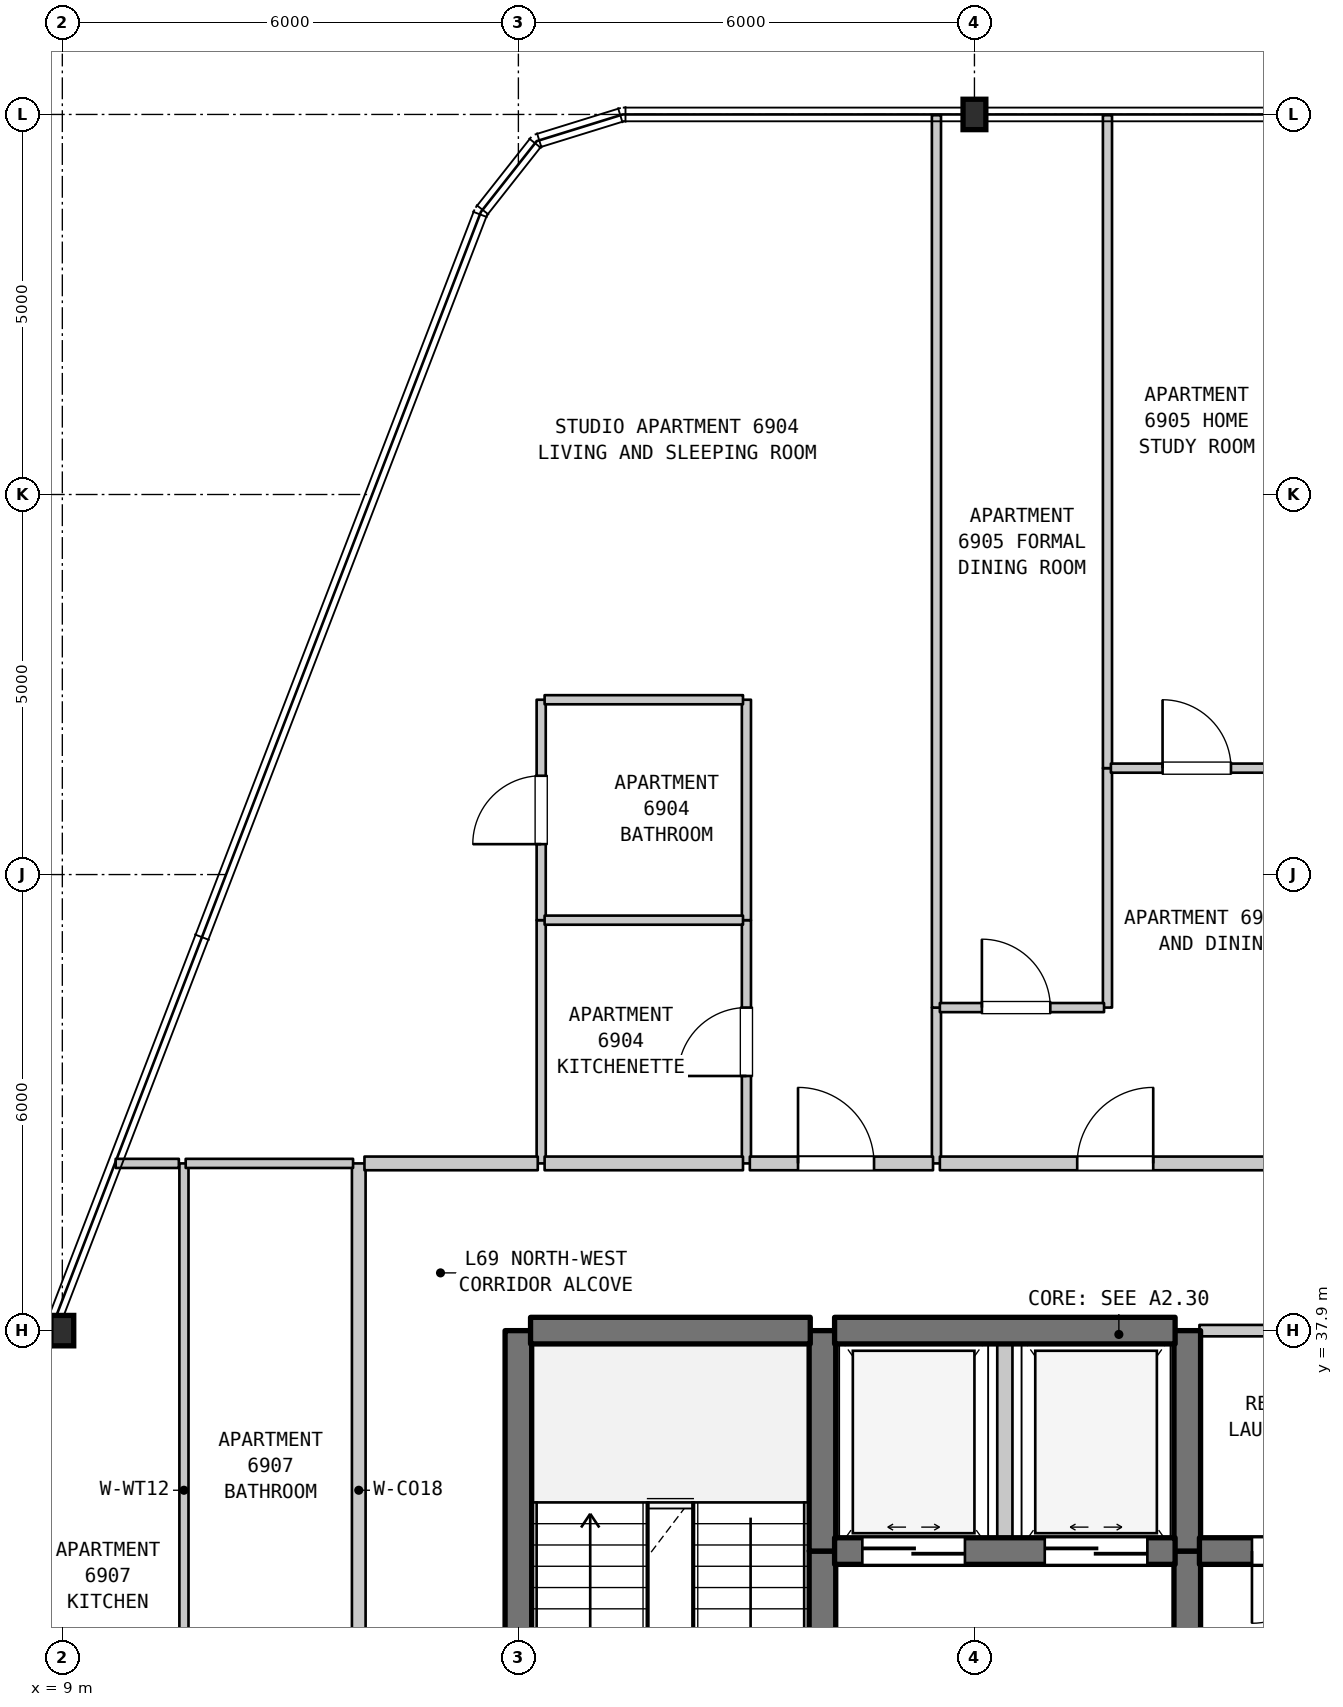
"""IFC4 building model, lengths in metres.
Left out: names, types, materials, properties, quantities, classifications, styles, units other than length and angle.
Written with IfcOpenShell. Run it as: python <this file> out.ifc"""

import sys

from ifc_helpers import new_model, si_unit, direction, frame, frame_2d, origin, origin_2d, place, context, subcontext, project, spatial, rectangle, i_section, extrude, element, fill, save


model = new_model("IFC4")
c1 = context("Model", 3, precision=1e-05, world=origin(), true_north=direction((0.0, 1.0)))
c2 = subcontext(c1, "Body", "Model", "MODEL_VIEW")
j1 = project(units=[si_unit("LENGTHUNIT", "METRE"), si_unit("PLANEANGLEUNIT", "RADIAN")], contexts=[c1])
p1 = place(None, origin())
s1 = spatial("IfcSite", under=j1, at=p1, CompositionType="ELEMENT")
p2 = place(p1, origin())
s2 = spatial("IfcBuilding", under=s1, at=p2, CompositionType="ELEMENT")
p3 = place(p2, frame((0.0, 0.0, 276.9)))
s3 = spatial("IfcBuildingStorey", under=s2, at=p3, CompositionType="ELEMENT", Elevation=276.9)
for number, where, z_axis, x_axis in (
    (1, (9.0, 37.9, 0.0), (0.0, 0.0, 1.0), (1.0, 0.0, 0.0)),
    (2, (21.0, 53.9, 0.0), (0.0, 0.0, 1.0), (1.0, 0.0, 0.0)),
):
    element("IfcColumn", number, at=place(p3, frame(where, z_axis=z_axis, x_axis=x_axis)), inside=s3, PredefinedType="COLUMN", context=c2, shape_type="SweptSolid", body=[
        extrude(i_section(OverallWidth=0.3, OverallDepth=0.4, WebThickness=0.013, FlangeThickness=0.024, FilletRadius=0.027, at=origin_2d()), origin(), (0.0, 0.0, 1.0), 3.7),
    ])
p4 = place(p3, frame((10.6, 31.5, 0.0), z_axis=(0.0, 0.0, 1.0), x_axis=(0.0, 1.0, 0.0)))
e3 = element("IfcWall", 3, at=p4, inside=s3, PredefinedType="PARTITIONING", context=c2, shape_type="SweptSolid", body=[
    extrude(rectangle(XDim=8.6, YDim=0.12, at=frame_2d((4.3, 0.0))), origin(), (0.0, 0.0, 1.0), 3.39),
])
p5 = place(p3, frame((12.9, 31.5, 0.0), z_axis=(0.0, 0.0, 1.0), x_axis=(0.0, 1.0, 0.0)))
e4 = element("IfcWall", 4, at=p5, inside=s3, PredefinedType="STANDARD", context=c2, shape_type="SweptSolid", body=[
    extrude(rectangle(XDim=8.6, YDim=0.18, at=frame_2d((4.3, 0.0))), origin(), (0.0, 0.0, 1.0), 3.39),
])
p6 = place(p3, frame((15.0, 31.1, 0.0), z_axis=(0.0, 0.0, 1.0), x_axis=(0.0, 1.0, 0.0)))
e5 = element("IfcWall", 5, at=p6, inside=s3, PredefinedType="SHEAR", context=c2, shape_type="SweptSolid", body=[
    extrude(rectangle(XDim=6.8, YDim=0.35, at=frame_2d((3.4, 0.0))), origin(), (0.0, 0.0, 1.0), 3.39),
])
p7 = place(p3, frame((15.3, 40.1, 0.0), z_axis=(0.0, 0.0, 1.0), x_axis=(0.0, 1.0, 0.0)))
e6 = element("IfcWall", 6, at=p7, inside=s3, PredefinedType="PARTITIONING", context=c2, shape_type="SweptSolid", body=[
    extrude(rectangle(XDim=3.2, YDim=0.12, at=frame_2d((1.6, 0.0))), origin(), (0.0, 0.0, 1.0), 3.39),
])
p8 = place(p3, frame((15.3, 43.3, 0.0), z_axis=(0.0, 0.0, 1.0), x_axis=(0.0, 1.0, 0.0)))
e7 = element("IfcWall", 7, at=p8, inside=s3, PredefinedType="PARTITIONING", context=c2, shape_type="SweptSolid", body=[
    extrude(rectangle(XDim=2.9, YDim=0.12, at=frame_2d((1.45, 0.0))), origin(), (0.0, 0.0, 1.0), 3.39),
])
p9 = place(p8, frame((1.0, 0.0, 0.0)))
e8 = element("IfcOpeningElement", 8, at=p9, cuts=e7, PredefinedType="OPENING", context=c2, shape_type="SweptSolid", body=[
    extrude(rectangle(XDim=0.9, YDim=2.1, at=frame_2d((0.45, 1.05))), frame((0.0, 0.07, 0.0), z_axis=(0.0, -1.0, 0.0), x_axis=(1.0, 0.0, 0.0)), (0.0, 0.0, 1.0), 0.14),
])
p10 = place(p3, frame((18.0, 40.1, 0.0), z_axis=(0.0, 0.0, 1.0), x_axis=(0.0, 1.0, 0.0)))
e9 = element("IfcWall", 9, at=p10, inside=s3, PredefinedType="PARTITIONING", context=c2, shape_type="SweptSolid", body=[
    extrude(rectangle(XDim=3.2, YDim=0.12, at=frame_2d((1.6, 0.0))), origin(), (0.0, 0.0, 1.0), 3.39),
])
p11 = place(p10, frame((1.15, 0.0, 0.0)))
e10 = element("IfcOpeningElement", 10, at=p11, cuts=e9, PredefinedType="OPENING", context=c2, shape_type="SweptSolid", body=[
    extrude(rectangle(XDim=0.9, YDim=2.15, at=frame_2d((0.45, 1.075))), frame((0.0, 0.07, 0.0), z_axis=(0.0, -1.0, 0.0), x_axis=(1.0, 0.0, 0.0)), (0.0, 0.0, 1.0), 0.14),
])
p12 = place(p3, frame((18.0, 43.3, 0.0), z_axis=(0.0, 0.0, 1.0), x_axis=(0.0, 1.0, 0.0)))
e11 = element("IfcWall", 11, at=p12, inside=s3, PredefinedType="PARTITIONING", context=c2, shape_type="SweptSolid", body=[
    extrude(rectangle(XDim=2.9, YDim=0.12, at=frame_2d((1.45, 0.0))), origin(), (0.0, 0.0, 1.0), 3.39),
])
p13 = place(p3, frame((19.0, 29.5, 0.0), z_axis=(0.0, 0.0, 1.0), x_axis=(0.0, 1.0, 0.0)))
e12 = element("IfcWall", 12, at=p13, inside=s3, PredefinedType="SHEAR", context=c2, shape_type="SweptSolid", body=[
    extrude(rectangle(XDim=5.5, YDim=0.35, at=frame_2d((2.75, 0.0))), origin(), (0.0, 0.0, 1.0), 3.39),
])
p14 = place(p13, frame((2.025, 0.0, 0.0)))
e13 = element("IfcOpeningElement", 13, at=p14, cuts=e12, PredefinedType="OPENING", context=c2, shape_type="SweptSolid", body=[
    extrude(rectangle(XDim=1.1, YDim=2.15, at=frame_2d((0.55, 1.075))), frame((0.0, 0.185, 0.0), z_axis=(0.0, -1.0, 0.0), x_axis=(1.0, 0.0, 0.0)), (0.0, 0.0, 1.0), 0.37),
])
p15 = place(p3, frame((19.0, 35.0, 0.0), z_axis=(0.0, 0.0, 1.0), x_axis=(0.0, 1.0, 0.0)))
e14 = element("IfcWall", 14, at=p15, inside=s3, PredefinedType="SHEAR", context=c2, shape_type="SweptSolid", body=[
    extrude(rectangle(XDim=2.9, YDim=0.35, at=frame_2d((1.45, 0.0))), origin(), (0.0, 0.0, 1.0), 3.39),
])
p16 = place(p3, frame((20.5, 40.1, 0.0), z_axis=(0.0, 0.0, 1.0), x_axis=(0.0, 1.0, 0.0)))
e15 = element("IfcWall", 15, at=p16, inside=s3, PredefinedType="PARTITIONING", context=c2, shape_type="SweptSolid", body=[
    extrude(rectangle(XDim=2.05, YDim=0.12, at=frame_2d((1.025, 0.0))), origin(), (0.0, 0.0, 1.0), 3.39),
])
p17 = place(p3, frame((20.5, 42.15, 0.0), z_axis=(0.0, 0.0, 1.0), x_axis=(0.0, 1.0, 0.0)))
e16 = element("IfcWall", 16, at=p17, inside=s3, PredefinedType="PARTITIONING", context=c2, shape_type="SweptSolid", body=[
    extrude(rectangle(XDim=11.74, YDim=0.12, at=frame_2d((5.87, 0.0))), origin(), (0.0, 0.0, 1.0), 3.39),
])
p18 = place(p3, frame((21.4, 35.0, 0.0), z_axis=(0.0, 0.0, 1.0), x_axis=(0.0, 1.0, 0.0)))
e17 = element("IfcWall", 17, at=p18, inside=s3, PredefinedType="STANDARD", context=c2, shape_type="SweptSolid", body=[
    extrude(rectangle(XDim=2.9, YDim=0.2, at=frame_2d((1.45, 0.0))), origin(), (0.0, 0.0, 1.0), 3.39),
])
p19 = place(p3, frame((22.75, 42.15, 0.0), z_axis=(0.0, 0.0, 1.0), x_axis=(0.0, 1.0, 0.0)))
e18 = element("IfcWall", 18, at=p19, inside=s3, PredefinedType="PARTITIONING", context=c2, shape_type="SweptSolid", body=[
    extrude(rectangle(XDim=3.15, YDim=0.12, at=frame_2d((1.575, 0.0))), origin(), (0.0, 0.0, 1.0), 3.39),
])
p20 = place(p3, frame((22.75, 45.3, 0.0), z_axis=(0.0, 0.0, 1.0), x_axis=(0.0, 1.0, 0.0)))
e19 = element("IfcWall", 19, at=p20, inside=s3, PredefinedType="PARTITIONING", context=c2, shape_type="SweptSolid", body=[
    extrude(rectangle(XDim=8.59, YDim=0.12, at=frame_2d((4.295, 0.0))), origin(), (0.0, 0.0, 1.0), 3.39),
])
p21 = place(p3, frame((23.8, 31.5, 0.0), z_axis=(0.0, 0.0, 1.0), x_axis=(0.0, 1.0, 0.0)))
e20 = element("IfcWall", 20, at=p21, inside=s3, PredefinedType="SHEAR", context=c2, shape_type="SweptSolid", body=[
    extrude(rectangle(XDim=3.5, YDim=0.35, at=frame_2d((1.75, 0.0))), origin(), (0.0, 0.0, 1.0), 3.39),
])
p22 = place(p21, frame((1.127, 0.0, 0.0)))
e21 = element("IfcOpeningElement", 21, at=p22, cuts=e20, PredefinedType="OPENING", context=c2, shape_type="SweptSolid", body=[
    extrude(rectangle(XDim=1.1, YDim=2.15, at=frame_2d((0.55, 1.075))), frame((0.0, 0.185, 0.0), z_axis=(0.0, -1.0, 0.0), x_axis=(1.0, 0.0, 0.0)), (0.0, 0.0, 1.0), 0.37),
])
p23 = place(p3, frame((23.8, 35.0, 0.0), z_axis=(0.0, 0.0, 1.0), x_axis=(0.0, 1.0, 0.0)))
e22 = element("IfcWall", 22, at=p23, inside=s3, PredefinedType="SHEAR", context=c2, shape_type="SweptSolid", body=[
    extrude(rectangle(XDim=2.9, YDim=0.35, at=frame_2d((1.45, 0.0))), origin(), (0.0, 0.0, 1.0), 3.39),
])
p24 = place(p3, frame((19.16, 35.0, 0.0), z_axis=(0.0, 0.0, 1.0), x_axis=(1.0, 0.0, 0.0)))
e23 = element("IfcWall", 23, at=p24, inside=s3, PredefinedType="SHEAR", context=c2, shape_type="SweptSolid", body=[
    extrude(rectangle(XDim=4.48, YDim=0.35, at=frame_2d((2.24, 0.0))), origin(), (0.0, 0.0, 1.0), 3.39),
])
p25 = place(p24, frame((0.365, 0.0, 0.0)))
e24 = element("IfcOpeningElement", 24, at=p25, cuts=e23, PredefinedType="OPENING", context=c2, shape_type="SweptSolid", body=[
    extrude(rectangle(XDim=1.35, YDim=2.2, at=frame_2d((0.675, 1.1))), frame((0.0, 0.185, 0.0), z_axis=(0.0, -1.0, 0.0), x_axis=(1.0, 0.0, 0.0)), (0.0, 0.0, 1.0), 0.37),
])
p26 = place(p24, frame((2.765, 0.0, 0.0)))
e25 = element("IfcOpeningElement", 25, at=p26, cuts=e23, PredefinedType="OPENING", context=c2, shape_type="SweptSolid", body=[
    extrude(rectangle(XDim=1.35, YDim=2.2, at=frame_2d((0.675, 1.1))), frame((0.0, 0.185, 0.0), z_axis=(0.0, -1.0, 0.0), x_axis=(1.0, 0.0, 0.0)), (0.0, 0.0, 1.0), 0.37),
])
p27 = place(p3, frame((23.96, 35.0, 0.0), z_axis=(0.0, 0.0, 1.0), x_axis=(1.0, 0.0, 0.0)))
e26 = element("IfcWall", 26, at=p27, inside=s3, PredefinedType="SHEAR", context=c2, shape_type="SweptSolid", body=[
    extrude(rectangle(XDim=2.595, YDim=0.35, at=frame_2d((1.297, 0.0))), origin(), (0.0, 0.0, 1.0), 3.39),
])
p28 = place(p27, frame((0.691, 0.0, 0.0)))
e27 = element("IfcOpeningElement", 27, at=p28, cuts=e26, PredefinedType="OPENING", context=c2, shape_type="SweptSolid", body=[
    extrude(rectangle(XDim=0.95, YDim=2.15, at=frame_2d((0.475, 1.075))), frame((0.0, 0.185, 0.0), z_axis=(0.0, -1.0, 0.0), x_axis=(1.0, 0.0, 0.0)), (0.0, 0.0, 1.0), 0.37),
])
p29 = place(p3, frame((15.16, 37.9, 0.0), z_axis=(0.0, 0.0, 1.0), x_axis=(1.0, 0.0, 0.0)))
e28 = element("IfcWall", 28, at=p29, inside=s3, PredefinedType="SHEAR", context=c2, shape_type="SweptSolid", body=[
    extrude(rectangle(XDim=3.68, YDim=0.35, at=frame_2d((1.84, 0.0))), origin(), (0.0, 0.0, 1.0), 3.39),
])
p30 = place(p3, frame((19.16, 37.9, 0.0), z_axis=(0.0, 0.0, 1.0), x_axis=(1.0, 0.0, 0.0)))
e29 = element("IfcWall", 29, at=p30, inside=s3, PredefinedType="SHEAR", context=c2, shape_type="SweptSolid", body=[
    extrude(rectangle(XDim=4.48, YDim=0.35, at=frame_2d((2.24, 0.0))), origin(), (0.0, 0.0, 1.0), 3.39),
])
p31 = place(p3, frame((23.96, 37.9, 0.0), z_axis=(0.0, 0.0, 1.0), x_axis=(1.0, 0.0, 0.0)))
e30 = element("IfcWall", 30, at=p31, inside=s3, PredefinedType="STANDARD", context=c2, shape_type="SweptSolid", body=[
    extrude(rectangle(XDim=2.595, YDim=0.15, at=frame_2d((1.297, 0.0))), origin(), (0.0, 0.0, 1.0), 2.89),
])
p32 = place(p3, frame((9.702, 40.1, 0.0), z_axis=(0.0, 0.0, 1.0), x_axis=(1.0, 0.0, 0.0)))
e31 = element("IfcWall", 31, at=p32, inside=s3, PredefinedType="PARTITIONING", context=c2, shape_type="SweptSolid", body=[
    extrude(rectangle(XDim=0.831, YDim=0.12, at=frame_2d((0.416, 0.0))), origin(), (0.0, 0.0, 1.0), 3.39),
])
p33 = place(p3, frame((10.623, 40.1, 0.0), z_axis=(0.0, 0.0, 1.0), x_axis=(1.0, 0.0, 0.0)))
e32 = element("IfcWall", 32, at=p33, inside=s3, PredefinedType="PARTITIONING", context=c2, shape_type="SweptSolid", body=[
    extrude(rectangle(XDim=2.202, YDim=0.12, at=frame_2d((1.101, 0.0))), origin(), (0.0, 0.0, 1.0), 3.39),
])
p34 = place(p3, frame((12.975, 40.1, 0.0), z_axis=(0.0, 0.0, 1.0), x_axis=(1.0, 0.0, 0.0)))
e33 = element("IfcWall", 33, at=p34, inside=s3, PredefinedType="STANDARD", context=c2, shape_type="SweptSolid", body=[
    extrude(rectangle(XDim=2.28, YDim=0.18, at=frame_2d((1.14, 0.0))), origin(), (0.0, 0.0, 1.0), 3.39),
])
p35 = place(p3, frame((15.345, 40.1, 0.0), z_axis=(0.0, 0.0, 1.0), x_axis=(1.0, 0.0, 0.0)))
e34 = element("IfcWall", 34, at=p35, inside=s3, PredefinedType="STANDARD", context=c2, shape_type="SweptSolid", body=[
    extrude(rectangle(XDim=2.61, YDim=0.18, at=frame_2d((1.305, 0.0))), origin(), (0.0, 0.0, 1.0), 3.39),
])
p36 = place(p3, frame((18.045, 40.1, 0.0), z_axis=(0.0, 0.0, 1.0), x_axis=(1.0, 0.0, 0.0)))
e35 = element("IfcWall", 35, at=p36, inside=s3, PredefinedType="STANDARD", context=c2, shape_type="SweptSolid", body=[
    extrude(rectangle(XDim=2.41, YDim=0.18, at=frame_2d((1.205, 0.0))), origin(), (0.0, 0.0, 1.0), 3.39),
])
p37 = place(p36, frame((0.634, 0.0, 0.0)))
e36 = element("IfcOpeningElement", 36, at=p37, cuts=e35, PredefinedType="OPENING", context=c2, shape_type="SweptSolid", body=[
    extrude(rectangle(XDim=1.0, YDim=2.15, at=frame_2d((0.5, 1.075))), frame((0.0, 0.1, 0.0), z_axis=(0.0, -1.0, 0.0), x_axis=(1.0, 0.0, 0.0)), (0.0, 0.0, 1.0), 0.2),
])
p38 = place(p3, frame((20.545, 40.1, 0.0), z_axis=(0.0, 0.0, 1.0), x_axis=(1.0, 0.0, 0.0)))
e37 = element("IfcWall", 37, at=p38, inside=s3, PredefinedType="STANDARD", context=c2, shape_type="SweptSolid", body=[
    extrude(rectangle(XDim=5.095, YDim=0.18, at=frame_2d((2.547, 0.0))), origin(), (0.0, 0.0, 1.0), 3.39),
])
p39 = place(p38, frame((1.807, 0.0, 0.0)))
e38 = element("IfcOpeningElement", 38, at=p39, cuts=e37, PredefinedType="OPENING", context=c2, shape_type="SweptSolid", body=[
    extrude(rectangle(XDim=1.0, YDim=2.15, at=frame_2d((0.5, 1.075))), frame((0.0, 0.1, 0.0), z_axis=(0.0, -1.0, 0.0), x_axis=(1.0, 0.0, 0.0)), (0.0, 0.0, 1.0), 0.2),
])
p40 = place(p3, frame((20.545, 42.15, 0.0), z_axis=(0.0, 0.0, 1.0), x_axis=(1.0, 0.0, 0.0)))
e39 = element("IfcWall", 39, at=p40, inside=s3, PredefinedType="PARTITIONING", context=c2, shape_type="SweptSolid", body=[
    extrude(rectangle(XDim=2.16, YDim=0.12, at=frame_2d((1.08, 0.0))), origin(), (0.0, 0.0, 1.0), 3.39),
])
p41 = place(p40, frame((0.553, 0.0, 0.0)))
e40 = element("IfcOpeningElement", 40, at=p41, cuts=e39, PredefinedType="OPENING", context=c2, shape_type="SweptSolid", body=[
    extrude(rectangle(XDim=0.9, YDim=2.15, at=frame_2d((0.45, 1.075))), frame((0.0, 0.07, 0.0), z_axis=(0.0, -1.0, 0.0), x_axis=(1.0, 0.0, 0.0)), (0.0, 0.0, 1.0), 0.14),
])
p42 = place(p3, frame((15.345, 43.3, 0.0), z_axis=(0.0, 0.0, 1.0), x_axis=(1.0, 0.0, 0.0)))
e41 = element("IfcWall", 41, at=p42, inside=s3, PredefinedType="PARTITIONING", context=c2, shape_type="SweptSolid", body=[
    extrude(rectangle(XDim=2.61, YDim=0.12, at=frame_2d((1.305, 0.0))), origin(), (0.0, 0.0, 1.0), 3.39),
])
p43 = place(p3, frame((22.795, 45.3, 0.0), z_axis=(0.0, 0.0, 1.0), x_axis=(1.0, 0.0, 0.0)))
e42 = element("IfcWall", 42, at=p43, inside=s3, PredefinedType="PARTITIONING", context=c2, shape_type="SweptSolid", body=[
    extrude(rectangle(XDim=2.26, YDim=0.12, at=frame_2d((1.13, 0.0))), origin(), (0.0, 0.0, 1.0), 3.39),
])
p44 = place(p43, frame((0.68, 0.0, 0.0)))
e43 = element("IfcOpeningElement", 43, at=p44, cuts=e42, PredefinedType="OPENING", context=c2, shape_type="SweptSolid", body=[
    extrude(rectangle(XDim=0.9, YDim=2.15, at=frame_2d((0.45, 1.075))), frame((0.0, 0.07, 0.0), z_axis=(0.0, -1.0, 0.0), x_axis=(1.0, 0.0, 0.0)), (0.0, 0.0, 1.0), 0.14),
])
p45 = place(p3, frame((15.345, 46.2, 0.0), z_axis=(0.0, 0.0, 1.0), x_axis=(1.0, 0.0, 0.0)))
e44 = element("IfcWall", 44, at=p45, inside=s3, PredefinedType="PARTITIONING", context=c2, shape_type="SweptSolid", body=[
    extrude(rectangle(XDim=2.61, YDim=0.12, at=frame_2d((1.305, 0.0))), origin(), (0.0, 0.0, 1.0), 3.39),
])
p46 = place(p9, origin())
e45 = element("IfcDoor", 45, at=p46, inside=s3, OperationType="SINGLE_SWING_LEFT", PredefinedType="DOOR", context=c2, shape_type="SweptSolid", body=[
    extrude(rectangle(XDim=0.9, YDim=2.1, at=frame_2d((0.45, 1.05))), frame((0.0, 0.025, 0.0), z_axis=(0.0, -1.0, 0.0), x_axis=(1.0, 0.0, 0.0)), (0.0, 0.0, 1.0), 0.05),
])
fill(e8, e45)
p47 = place(p11, origin())
e46 = element("IfcDoor", 46, at=p47, inside=s3, OperationType="SINGLE_SWING_LEFT", PredefinedType="DOOR", context=c2, shape_type="SweptSolid", body=[
    extrude(rectangle(XDim=0.9, YDim=2.15, at=frame_2d((0.45, 1.075))), frame((0.0, 0.025, 0.0), z_axis=(0.0, -1.0, 0.0), x_axis=(1.0, 0.0, 0.0)), (0.0, 0.0, 1.0), 0.05),
])
fill(e10, e46)
p48 = place(p25, origin())
e47 = element("IfcDoor", 47, at=p48, inside=s3, OperationType="DOUBLE_DOOR_SLIDING", PredefinedType="DOOR", context=c2, shape_type="SweptSolid", body=[
    extrude(rectangle(XDim=1.35, YDim=2.2, at=frame_2d((0.675, 1.1))), frame((0.0, 0.025, 0.0), z_axis=(0.0, -1.0, 0.0), x_axis=(1.0, 0.0, 0.0)), (0.0, 0.0, 1.0), 0.05),
])
fill(e24, e47)
p49 = place(p26, origin())
e48 = element("IfcDoor", 48, at=p49, inside=s3, OperationType="DOUBLE_DOOR_SLIDING", PredefinedType="DOOR", context=c2, shape_type="SweptSolid", body=[
    extrude(rectangle(XDim=1.35, YDim=2.2, at=frame_2d((0.675, 1.1))), frame((0.0, 0.025, 0.0), z_axis=(0.0, -1.0, 0.0), x_axis=(1.0, 0.0, 0.0)), (0.0, 0.0, 1.0), 0.05),
])
fill(e25, e48)
p50 = place(p28, frame((0.95, 0.0, 0.0), z_axis=(0.0, 0.0, 1.0), x_axis=(-1.0, 0.0, 0.0)))
e49 = element("IfcDoor", 49, at=p50, inside=s3, OperationType="SINGLE_SWING_LEFT", PredefinedType="DOOR", context=c2, shape_type="SweptSolid", body=[
    extrude(rectangle(XDim=0.95, YDim=2.15, at=frame_2d((0.475, 1.075))), frame((0.0, 0.025, 0.0), z_axis=(0.0, -1.0, 0.0), x_axis=(1.0, 0.0, 0.0)), (0.0, 0.0, 1.0), 0.05),
])
fill(e27, e49)
p51 = place(p37, origin())
e50 = element("IfcDoor", 50, at=p51, inside=s3, OperationType="SINGLE_SWING_LEFT", PredefinedType="DOOR", context=c2, shape_type="SweptSolid", body=[
    extrude(rectangle(XDim=1.0, YDim=2.15, at=frame_2d((0.5, 1.075))), frame((0.0, 0.025, 0.0), z_axis=(0.0, -1.0, 0.0), x_axis=(1.0, 0.0, 0.0)), (0.0, 0.0, 1.0), 0.05),
])
fill(e36, e50)
p52 = place(p39, origin())
e51 = element("IfcDoor", 51, at=p52, inside=s3, OperationType="SINGLE_SWING_RIGHT", PredefinedType="DOOR", context=c2, shape_type="SweptSolid", body=[
    extrude(rectangle(XDim=1.0, YDim=2.15, at=frame_2d((0.5, 1.075))), frame((0.0, 0.025, 0.0), z_axis=(0.0, -1.0, 0.0), x_axis=(1.0, 0.0, 0.0)), (0.0, 0.0, 1.0), 0.05),
])
fill(e38, e51)
p53 = place(p41, origin())
e52 = element("IfcDoor", 52, at=p53, inside=s3, OperationType="SINGLE_SWING_LEFT", PredefinedType="DOOR", context=c2, shape_type="SweptSolid", body=[
    extrude(rectangle(XDim=0.9, YDim=2.15, at=frame_2d((0.45, 1.075))), frame((0.0, 0.025, 0.0), z_axis=(0.0, -1.0, 0.0), x_axis=(1.0, 0.0, 0.0)), (0.0, 0.0, 1.0), 0.05),
])
fill(e40, e52)
p54 = place(p44, origin())
e53 = element("IfcDoor", 53, at=p54, inside=s3, OperationType="SINGLE_SWING_LEFT", PredefinedType="DOOR", context=c2, shape_type="SweptSolid", body=[
    extrude(rectangle(XDim=0.9, YDim=2.15, at=frame_2d((0.45, 1.075))), frame((0.0, 0.025, 0.0), z_axis=(0.0, -1.0, 0.0), x_axis=(1.0, 0.0, 0.0)), (0.0, 0.0, 1.0), 0.05),
])
fill(e43, e53)
save(model, sys.argv[1])
